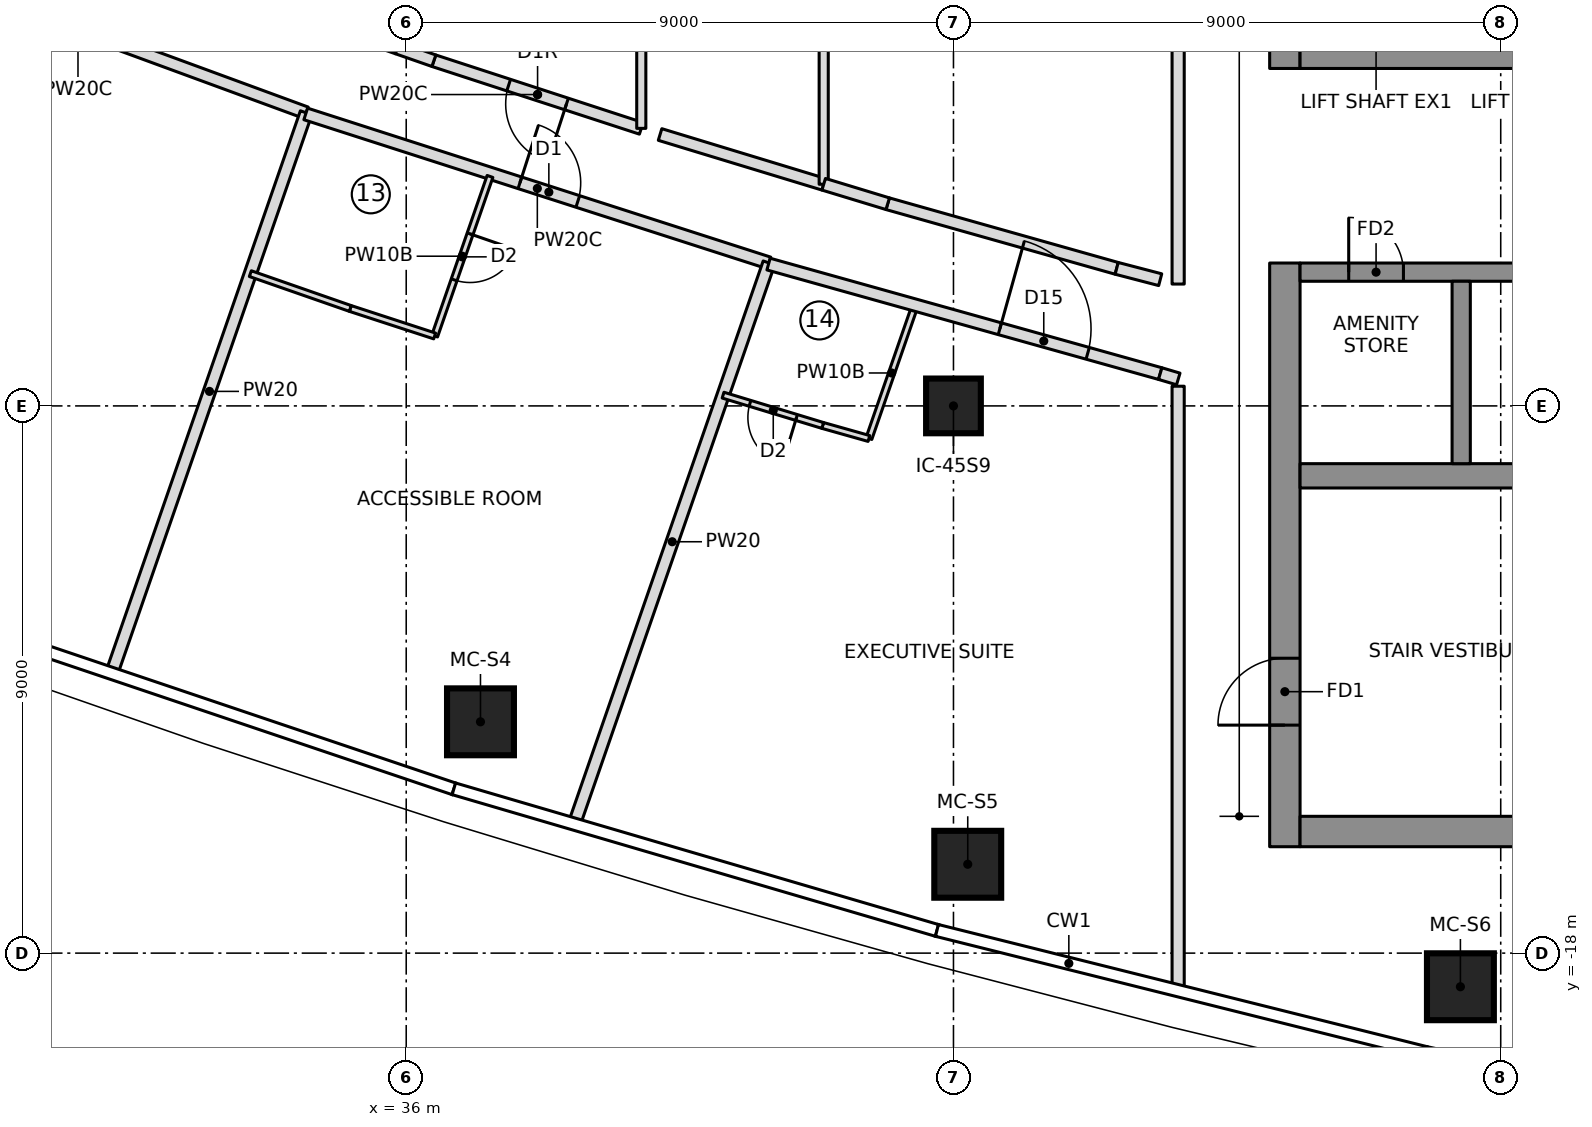
"""IFC4 building model, lengths in metres.
Left out: names, types, materials, properties, quantities, classifications, styles, units other than length and angle.
Written with IfcOpenShell. Run it as: python <this file> out.ifc"""

import sys

from ifc_helpers import new_model, si_unit, direction, frame, frame_2d, origin, origin_2d, place, context, subcontext, project, spatial, polyline, rectangle, outline, extrude, element, fill, save


model = new_model("IFC4")
c1 = context("Model", 3, precision=1e-05, world=origin(), true_north=direction((0.0, 1.0)))
c2 = subcontext(c1, "Body", "Model", "MODEL_VIEW")
j1 = project(units=[si_unit("LENGTHUNIT", "METRE"), si_unit("PLANEANGLEUNIT", "RADIAN")], contexts=[c1])
p1 = place(None, origin())
s1 = spatial("IfcSite", under=j1, at=p1, CompositionType="ELEMENT")
p2 = place(p1, origin())
s2 = spatial("IfcBuilding", under=s1, at=p2, CompositionType="ELEMENT")
p3 = place(p2, frame((0.0, 0.0, 299.85)))
s3 = spatial("IfcBuildingStorey", under=s2, at=p3, CompositionType="ELEMENT", Elevation=299.85)
p4 = place(p3, frame((50.45, -3.45, 0.0), z_axis=(0.0, 0.0, 1.0), x_axis=(0.0, 1.0, 0.0)))
e1 = element("IfcWall", 1, at=p4, inside=s3, PredefinedType="SHEAR", context=c2, shape_type="SweptSolid", body=[
    extrude(rectangle(XDim=6.9, YDim=0.5, at=frame_2d((3.45, 0.0))), origin(), (0.0, 0.0, 1.0), 3.55),
])
p5 = place(p3, frame((50.45, -16.25, 0.0), z_axis=(0.0, 0.0, 1.0), x_axis=(0.0, 1.0, 0.0)))
e2 = element("IfcWall", 2, at=p5, inside=s3, PredefinedType="SHEAR", context=c2, shape_type="SweptSolid", body=[
    extrude(rectangle(XDim=9.6, YDim=0.5, at=frame_2d((4.8, 0.0))), origin(), (0.0, 0.0, 1.0), 3.55),
])
p6 = place(p5, frame((2.0, 0.0, 0.0)))
e3 = element("IfcOpeningElement", 3, at=p6, cuts=e2, PredefinedType="OPENING", context=c2, shape_type="SweptSolid", body=[
    extrude(rectangle(XDim=1.1, YDim=2.1, at=frame_2d((0.55, 1.05))), frame((0.0, 0.26, 0.0), z_axis=(0.0, -1.0, 0.0), x_axis=(1.0, 0.0, 0.0)), (0.0, 0.0, 1.0), 0.52),
])
p7 = place(p3, frame((50.7, -16.0, 0.0), z_axis=(0.0, 0.0, 1.0), x_axis=(1.0, 0.0, 0.0)))
e4 = element("IfcWall", 4, at=p7, inside=s3, PredefinedType="SHEAR", context=c2, shape_type="SweptSolid", body=[
    extrude(rectangle(XDim=13.52, YDim=0.5, at=frame_2d((6.76, 0.0))), origin(), (0.0, 0.0, 1.0), 3.55),
])
p8 = place(p3, frame((50.7, -10.15, 0.0), z_axis=(0.0, 0.0, 1.0), x_axis=(1.0, 0.0, 0.0)))
e5 = element("IfcWall", 5, at=p8, inside=s3, PredefinedType="SHEAR", context=c2, shape_type="SweptSolid", body=[
    extrude(rectangle(XDim=13.02, YDim=0.4, at=frame_2d((6.51, 0.0))), origin(), (0.0, 0.0, 1.0), 3.55),
])
p9 = place(p3, frame((50.7, -3.3, 0.0), z_axis=(0.0, 0.0, 1.0), x_axis=(1.0, 0.0, 0.0)))
e6 = element("IfcWall", 6, at=p9, inside=s3, PredefinedType="SHEAR", context=c2, shape_type="SweptSolid", body=[
    extrude(rectangle(XDim=10.9, YDim=0.3, at=frame_2d((5.45, 0.0))), origin(), (0.0, 0.0, 1.0), 3.55),
])
p10 = place(p9, frame((9.1, 0.0, 0.0)))
e7 = element("IfcOpeningElement", 7, at=p10, cuts=e6, PredefinedType="OPENING", context=c2, shape_type="SweptSolid", body=[
    extrude(rectangle(XDim=1.1, YDim=2.1, at=frame_2d((0.55, 1.05))), frame((0.0, 0.16, 0.0), z_axis=(0.0, -1.0, 0.0), x_axis=(1.0, 0.0, 0.0)), (0.0, 0.0, 1.0), 0.32),
])
p11 = place(p3, frame((50.7, -6.8, 0.0), z_axis=(0.0, 0.0, 1.0), x_axis=(1.0, 0.0, 0.0)))
e8 = element("IfcWall", 8, at=p11, inside=s3, PredefinedType="SHEAR", context=c2, shape_type="SweptSolid", body=[
    extrude(rectangle(XDim=10.9, YDim=0.3, at=frame_2d((5.45, 0.0))), origin(), (0.0, 0.0, 1.0), 3.55),
])
p12 = place(p11, frame((6.3, 0.0, 0.0)))
e9 = element("IfcOpeningElement", 9, at=p12, cuts=e8, PredefinedType="OPENING", context=c2, shape_type="SweptSolid", body=[
    extrude(rectangle(XDim=1.1, YDim=2.1, at=frame_2d((0.55, 1.05))), frame((0.0, 0.16, 0.0), z_axis=(0.0, -1.0, 0.0), x_axis=(1.0, 0.0, 0.0)), (0.0, 0.0, 1.0), 0.32),
])
p13 = place(p11, frame((9.1, 0.0, 0.0)))
e10 = element("IfcOpeningElement", 10, at=p13, cuts=e8, PredefinedType="OPENING", context=c2, shape_type="SweptSolid", body=[
    extrude(rectangle(XDim=1.1, YDim=2.1, at=frame_2d((0.55, 1.05))), frame((0.0, 0.16, 0.0), z_axis=(0.0, -1.0, 0.0), x_axis=(1.0, 0.0, 0.0)), (0.0, 0.0, 1.0), 0.32),
])
p14 = place(p11, frame((0.8, 0.0, 0.0)))
e11 = element("IfcOpeningElement", 11, at=p14, cuts=e8, PredefinedType="OPENING", context=c2, shape_type="SweptSolid", body=[
    extrude(rectangle(XDim=0.9, YDim=2.1, at=frame_2d((0.45, 1.05))), frame((0.0, 0.16, 0.0), z_axis=(0.0, -1.0, 0.0), x_axis=(1.0, 0.0, 0.0)), (0.0, 0.0, 1.0), 0.32),
])
p15 = place(p11, frame((3.6, 0.0, 0.0)))
e12 = element("IfcOpeningElement", 12, at=p15, cuts=e8, PredefinedType="OPENING", context=c2, shape_type="SweptSolid", body=[
    extrude(rectangle(XDim=0.9, YDim=2.1, at=frame_2d((0.45, 1.05))), frame((0.0, 0.16, 0.0), z_axis=(0.0, -1.0, 0.0), x_axis=(1.0, 0.0, 0.0)), (0.0, 0.0, 1.0), 0.32),
])
p16 = place(p3, frame((53.35, -9.95, 0.0), z_axis=(0.0, 0.0, 1.0), x_axis=(0.0, 1.0, 0.0)))
e13 = element("IfcWall", 13, at=p16, inside=s3, PredefinedType="SHEAR", context=c2, shape_type="SweptSolid", body=[
    extrude(rectangle(XDim=3.0, YDim=0.3, at=frame_2d((1.5, 0.0))), origin(), (0.0, 0.0, 1.0), 3.55),
])
for number, where, z_axis, x_axis in (
    (14, (37.221, -14.196, 0.0), (0.0, 0.0, 1.0), (1.0, 0.0, 0.0)),
    (15, (45.235, -16.539, 0.0), (0.0, 0.0, 1.0), (1.0, 0.0, 0.0)),
    (16, (53.337, -18.553, 0.0), (0.0, 0.0, 1.0), (1.0, 0.0, 0.0)),
):
    element("IfcColumn", number, at=place(p3, frame(where, z_axis=z_axis, x_axis=x_axis)), inside=s3, PredefinedType="COLUMN", context=c2, shape_type="SweptSolid", body=[
        extrude(rectangle(XDim=1.1, YDim=1.1, at=origin_2d()), origin(), (0.0, 0.0, 1.0), 3.55),
    ])
p17 = place(p3, frame((45.0, -9.0, 0.0), z_axis=(0.0, 0.0, 1.0), x_axis=(1.0, 0.0, 0.0)))
e17 = element("IfcColumn", 17, at=p17, inside=s3, PredefinedType="COLUMN", context=c2, shape_type="SweptSolid", body=[
    extrude(rectangle(XDim=0.9, YDim=0.9, at=origin_2d()), origin(), (0.0, 0.0, 1.0), 3.55),
])
p18 = place(p3, frame((52.738, -19.732, 0.0), z_axis=(0.0, 0.0, 1.0), x_axis=(0.977020225348, -0.213146614471, 0.0)))
e18 = element("IfcWall", 18, at=p18, inside=s3, PredefinedType="NOTDEFINED", context=c2, shape_type="SweptSolid", body=[
    extrude(outline(polyline([(0.0, -0.2), (4.171, -0.2), (4.113, 0.2), (0.0, 0.2), (0.0, -0.2)])), origin(), (0.0, 0.0, 1.0), 3.25),
])
p19 = place(p3, frame((26.85, -1.423, 0.0), z_axis=(0.0, 0.0, 1.0), x_axis=(0.938687309179, -0.344769684843, 0.0)))
e19 = element("IfcWall", 19, at=p19, inside=s3, PredefinedType="PARTITIONING", context=c2, shape_type="SweptSolid", body=[
    extrude(rectangle(XDim=7.994, YDim=0.2, at=frame_2d((3.997, 0.0))), origin(), (0.0, 0.0, 1.0), 3.15),
])
p20 = place(p19, frame((3.05, 0.0, 0.0)))
e20 = element("IfcOpeningElement", 20, at=p20, cuts=e19, PredefinedType="OPENING", context=c2, shape_type="SweptSolid", body=[
    extrude(rectangle(XDim=1.0, YDim=2.1, at=frame_2d((0.5, 1.05))), frame((0.0, 0.11, 0.0), z_axis=(0.0, -1.0, 0.0), x_axis=(1.0, 0.0, 0.0)), (0.0, 0.0, 1.0), 0.22),
])
p21 = place(p3, frame((31.175, -13.344, 0.0), z_axis=(0.0, 0.0, 1.0), x_axis=(0.327696596093, 0.944783012606, 0.0)))
e21 = element("IfcWall", 21, at=p21, inside=s3, PredefinedType="PARTITIONING", context=c2, shape_type="SweptSolid", body=[
    extrude(rectangle(XDim=9.7, YDim=0.2, at=frame_2d((4.85, 0.0))), origin(), (0.0, 0.0, 1.0), 3.15),
])
p22 = place(p3, frame((34.347, -4.198, 0.0), z_axis=(0.0, 0.0, 1.0), x_axis=(0.951959334907, -0.306224467805, 0.0)))
e22 = element("IfcWall", 22, at=p22, inside=s3, PredefinedType="PARTITIONING", context=c2, shape_type="SweptSolid", body=[
    extrude(rectangle(XDim=8.002, YDim=0.2, at=frame_2d((4.001, 0.0))), origin(), (0.0, 0.0, 1.0), 3.15),
])
p23 = place(p22, frame((3.7, 0.0, 0.0)))
e23 = element("IfcOpeningElement", 23, at=p23, cuts=e22, PredefinedType="OPENING", context=c2, shape_type="SweptSolid", body=[
    extrude(rectangle(XDim=1.0, YDim=2.1, at=frame_2d((0.5, 1.05))), frame((0.0, 0.11, 0.0), z_axis=(0.0, -1.0, 0.0), x_axis=(1.0, 0.0, 0.0)), (0.0, 0.0, 1.0), 0.22),
])
p24 = place(p3, frame((37.378, -5.226, 0.0), z_axis=(0.0, 0.0, 1.0), x_axis=(-0.327702248101, -0.944781052197, 0.0)))
e24 = element("IfcWall", 24, at=p24, inside=s3, PredefinedType="PARTITIONING", context=c2, shape_type="SweptSolid", body=[
    extrude(rectangle(XDim=2.777, YDim=0.1, at=frame_2d((1.389, 0.0))), origin(), (0.0, 0.0, 1.0), 3.15),
])
p25 = place(p24, frame((1.0, 0.0, 0.0)))
e25 = element("IfcOpeningElement", 25, at=p25, cuts=e24, PredefinedType="OPENING", context=c2, shape_type="SweptSolid", body=[
    extrude(rectangle(XDim=0.8, YDim=2.1, at=frame_2d((0.4, 1.05))), frame((0.0, 0.06, 0.0), z_axis=(0.0, -1.0, 0.0), x_axis=(1.0, 0.0, 0.0)), (0.0, 0.0, 1.0), 0.12),
])
p26 = place(p3, frame((36.468, -7.85, 0.0), z_axis=(0.0, 0.0, 1.0), x_axis=(-0.95070411494, 0.310099477322, 0.0)))
e26 = element("IfcWall", 26, at=p26, inside=s3, PredefinedType="PARTITIONING", context=c2, shape_type="SweptSolid", body=[
    extrude(rectangle(XDim=1.46, YDim=0.1, at=frame_2d((0.73, 0.0))), origin(), (0.0, 0.0, 1.0), 3.15),
])
p27 = place(p3, frame((35.08, -7.397, 0.0), z_axis=(0.0, 0.0, 1.0), x_axis=(-0.944260018318, 0.329200573825, 0.0)))
e27 = element("IfcWall", 27, at=p27, inside=s3, PredefinedType="PARTITIONING", context=c2, shape_type="SweptSolid", body=[
    extrude(rectangle(XDim=1.74, YDim=0.1, at=frame_2d((0.87, 0.0))), origin(), (0.0, 0.0, 1.0), 3.15),
])
p28 = place(p3, frame((38.784, -15.82, 0.0), z_axis=(0.0, 0.0, 1.0), x_axis=(0.327710853631, 0.944778067279, 0.0)))
e28 = element("IfcWall", 28, at=p28, inside=s3, PredefinedType="PARTITIONING", context=c2, shape_type="SweptSolid", body=[
    extrude(rectangle(XDim=9.707, YDim=0.2, at=frame_2d((4.854, 0.0))), origin(), (0.0, 0.0, 1.0), 3.15),
])
p29 = place(p3, frame((44.357, -7.381, 0.0), z_axis=(0.0, 0.0, 1.0), x_axis=(-0.32773175909, -0.944770815639, 0.0)))
e29 = element("IfcWall", 29, at=p29, inside=s3, PredefinedType="PARTITIONING", context=c2, shape_type="SweptSolid", body=[
    extrude(rectangle(XDim=2.281, YDim=0.1, at=frame_2d((1.141, 0.0))), origin(), (0.0, 0.0, 1.0), 3.15),
])
p30 = place(p3, frame((43.61, -9.536, 0.0), z_axis=(0.0, 0.0, 1.0), x_axis=(-0.962370937031, 0.271739175603, 0.0)))
e30 = element("IfcWall", 30, at=p30, inside=s3, PredefinedType="PARTITIONING", context=c2, shape_type="SweptSolid", body=[
    extrude(rectangle(XDim=0.79, YDim=0.1, at=frame_2d((0.395, 0.0))), origin(), (0.0, 0.0, 1.0), 3.15),
])
p31 = place(p3, frame((42.85, -9.321, 0.0), z_axis=(0.0, 0.0, 1.0), x_axis=(-0.95674463014, 0.290929050971, 0.0)))
e31 = element("IfcWall", 31, at=p31, inside=s3, PredefinedType="PARTITIONING", context=c2, shape_type="SweptSolid", body=[
    extrude(rectangle(XDim=1.713, YDim=0.1, at=frame_2d((0.856, 0.0))), origin(), (0.0, 0.0, 1.0), 3.15),
])
p32 = place(p31, frame((0.45, 0.0, 0.0)))
e32 = element("IfcOpeningElement", 32, at=p32, cuts=e31, PredefinedType="OPENING", context=c2, shape_type="SweptSolid", body=[
    extrude(rectangle(XDim=0.8, YDim=2.1, at=frame_2d((0.4, 1.05))), frame((0.0, 0.06, 0.0), z_axis=(0.0, -1.0, 0.0), x_axis=(1.0, 0.0, 0.0)), (0.0, 0.0, 1.0), 0.12),
])
p33 = place(p3, frame((35.855, -3.114, 0.0), z_axis=(0.0, 0.0, 1.0), x_axis=(-0.944260188635, 0.329200085296, 0.0)))
e33 = element("IfcWall", 33, at=p33, inside=s3, PredefinedType="PARTITIONING", context=c2, shape_type="SweptSolid", body=[
    extrude(rectangle(XDim=3.177, YDim=0.2, at=frame_2d((1.588, 0.0))), origin(), (0.0, 0.0, 1.0), 3.15),
])
p34 = place(p3, frame((39.866, -4.435, 0.0), z_axis=(0.0, 0.0, 1.0), x_axis=(-0.950718067733, 0.310056697535, 0.0)))
e34 = element("IfcWall", 34, at=p34, inside=s3, PredefinedType="PARTITIONING", context=c2, shape_type="SweptSolid", body=[
    extrude(rectangle(XDim=3.588, YDim=0.2, at=frame_2d((1.794, 0.0))), origin(), (0.0, 0.0, 1.0), 3.15),
])
p35 = place(p34, frame((1.294, 0.0, 0.0)))
e35 = element("IfcOpeningElement", 35, at=p35, cuts=e34, PredefinedType="OPENING", context=c2, shape_type="SweptSolid", body=[
    extrude(rectangle(XDim=1.0, YDim=2.1, at=frame_2d((0.5, 1.05))), frame((0.0, 0.11, 0.0), z_axis=(0.0, -1.0, 0.0), x_axis=(1.0, 0.0, 0.0)), (0.0, 0.0, 1.0), 0.22),
])
p36 = place(p3, frame((36.455, -3.323, 0.0), z_axis=(0.0, 0.0, 1.0), x_axis=(-0.944289130413, 0.329117058483, 0.0)))
e36 = element("IfcWall", 36, at=p36, inside=s3, PredefinedType="PARTITIONING", context=c2, shape_type="SweptSolid", body=[
    extrude(rectangle(XDim=0.635, YDim=0.2, at=frame_2d((0.317, 0.0))), origin(), (0.0, 0.0, 1.0), 3.15),
])
p37 = place(p3, frame((39.866, -4.435, 0.0), z_axis=(0.0, 0.0, 1.0), x_axis=(0.0, 1.0, 0.0)))
e37 = element("IfcWall", 37, at=p37, inside=s3, PredefinedType="PARTITIONING", context=c2, shape_type="SweptSolid", body=[
    extrude(rectangle(XDim=8.871, YDim=0.15, at=frame_2d((4.435, 0.0))), origin(), (0.0, 0.0, 1.0), 3.15),
])
p38 = place(p3, frame((42.866, -5.354, 0.0), z_axis=(0.0, 0.0, 1.0), x_axis=(-0.956742178936, 0.290937111838, 0.0)))
e38 = element("IfcWall", 38, at=p38, inside=s3, PredefinedType="PARTITIONING", context=c2, shape_type="SweptSolid", body=[
    extrude(rectangle(XDim=2.813, YDim=0.2, at=frame_2d((1.406, 0.0))), origin(), (0.0, 0.0, 1.0), 3.15),
])
p39 = place(p3, frame((42.866, -5.354, 0.0), z_axis=(0.0, 0.0, 1.0), x_axis=(0.0, 1.0, 0.0)))
e39 = element("IfcWall", 39, at=p39, inside=s3, PredefinedType="PARTITIONING", context=c2, shape_type="SweptSolid", body=[
    extrude(rectangle(XDim=10.709, YDim=0.15, at=frame_2d((5.354, 0.0))), origin(), (0.0, 0.0, 1.0), 3.15),
])
p40 = place(p3, frame((47.684, -6.738, 0.0), z_axis=(0.0, 0.0, 1.0), x_axis=(-0.962411212211, 0.271596499628, 0.0)))
e40 = element("IfcWall", 40, at=p40, inside=s3, PredefinedType="PARTITIONING", context=c2, shape_type="SweptSolid", body=[
    extrude(rectangle(XDim=3.913, YDim=0.2, at=frame_2d((1.957, 0.0))), origin(), (0.0, 0.0, 1.0), 3.15),
])
p41 = place(p3, frame((43.918, -5.675, 0.0), z_axis=(0.0, 0.0, 1.0), x_axis=(-0.956676567943, 0.291152785233, 0.0)))
e41 = element("IfcWall", 41, at=p41, inside=s3, PredefinedType="PARTITIONING", context=c2, shape_type="SweptSolid", body=[
    extrude(rectangle(XDim=1.1, YDim=0.2, at=frame_2d((0.55, 0.0))), origin(), (0.0, 0.0, 1.0), 3.15),
])
p42 = place(p3, frame((41.958, -6.667, 0.0), z_axis=(0.0, 0.0, 1.0), x_axis=(0.963063656884, -0.269273824925, 0.0)))
e42 = element("IfcWall", 42, at=p42, inside=s3, PredefinedType="PARTITIONING", context=c2, shape_type="SweptSolid", body=[
    extrude(rectangle(XDim=6.688, YDim=0.2, at=frame_2d((3.344, 0.0))), origin(), (0.0, 0.0, 1.0), 3.15),
])
p43 = place(p42, frame((3.95, 0.0, 0.0)))
e43 = element("IfcOpeningElement", 43, at=p43, cuts=e42, PredefinedType="OPENING", context=c2, shape_type="SweptSolid", body=[
    extrude(rectangle(XDim=1.5, YDim=2.1, at=frame_2d((0.75, 1.05))), frame((0.0, 0.11, 0.0), z_axis=(0.0, -1.0, 0.0), x_axis=(1.0, 0.0, 0.0)), (0.0, 0.0, 1.0), 0.22),
])
p44 = place(p3, frame((48.4, -6.924, 0.0), z_axis=(0.0, 0.0, 1.0), x_axis=(-0.967585713416, 0.252542842294, 0.0)))
e44 = element("IfcWall", 44, at=p44, inside=s3, PredefinedType="PARTITIONING", context=c2, shape_type="SweptSolid", body=[
    extrude(rectangle(XDim=0.74, YDim=0.2, at=frame_2d((0.37, 0.0))), origin(), (0.0, 0.0, 1.0), 3.15),
])
p45 = place(p3, frame((48.695, 6.996, 0.0), z_axis=(0.0, 0.0, 1.0), x_axis=(0.0, -1.0, 0.0)))
e45 = element("IfcWall", 45, at=p45, inside=s3, PredefinedType="PARTITIONING", context=c2, shape_type="SweptSolid", body=[
    extrude(rectangle(XDim=13.992, YDim=0.2, at=frame_2d((6.996, 0.0))), origin(), (0.0, 0.0, 1.0), 3.15),
])
p46 = place(p3, frame((48.4, -8.469, 0.0), z_axis=(0.0, 0.0, 1.0), x_axis=(0.958495645602, -0.285107168207, 0.0)))
e46 = element("IfcWall", 46, at=p46, inside=s3, PredefinedType="PARTITIONING", context=c2, shape_type="SweptSolid", body=[
    extrude(rectangle(XDim=0.31, YDim=0.2, at=frame_2d((0.155, 0.0))), origin(), (0.0, 0.0, 1.0), 3.15),
])
p47 = place(p3, frame((48.695, -8.676, 0.0), z_axis=(0.0, 0.0, 1.0), x_axis=(0.0, -1.0, 0.0)))
e47 = element("IfcWall", 47, at=p47, inside=s3, PredefinedType="PARTITIONING", context=c2, shape_type="SweptSolid", body=[
    extrude(rectangle(XDim=9.877, YDim=0.2, at=frame_2d((4.938, 0.0))), origin(), (0.0, 0.0, 1.0), 3.15),
])
p48 = place(p25, origin())
e48 = element("IfcDoor", 48, at=p48, inside=s3, OperationType="SINGLE_SWING_LEFT", PredefinedType="DOOR", context=c2, shape_type="SweptSolid", body=[
    extrude(rectangle(XDim=0.8, YDim=2.1, at=frame_2d((0.4, 1.05))), frame((0.0, 0.025, 0.0), z_axis=(0.0, -1.0, 0.0), x_axis=(1.0, 0.0, 0.0)), (0.0, 0.0, 1.0), 0.05),
])
fill(e25, e48)
p49 = place(p23, origin())
e49 = element("IfcDoor", 49, at=p49, inside=s3, OperationType="SINGLE_SWING_LEFT", PredefinedType="DOOR", context=c2, shape_type="SweptSolid", body=[
    extrude(rectangle(XDim=1.0, YDim=2.1, at=frame_2d((0.5, 1.05))), frame((0.0, 0.025, 0.0), z_axis=(0.0, -1.0, 0.0), x_axis=(1.0, 0.0, 0.0)), (0.0, 0.0, 1.0), 0.05),
])
fill(e23, e49)
p50 = place(p32, origin())
e50 = element("IfcDoor", 50, at=p50, inside=s3, OperationType="SINGLE_SWING_LEFT", PredefinedType="DOOR", context=c2, shape_type="SweptSolid", body=[
    extrude(rectangle(XDim=0.8, YDim=2.1, at=frame_2d((0.4, 1.05))), frame((0.0, 0.025, 0.0), z_axis=(0.0, -1.0, 0.0), x_axis=(1.0, 0.0, 0.0)), (0.0, 0.0, 1.0), 0.05),
])
fill(e32, e50)
p51 = place(p43, origin())
e51 = element("IfcDoor", 51, at=p51, inside=s3, OperationType="DOUBLE_DOOR_SINGLE_SWING", PredefinedType="DOOR", context=c2, shape_type="SweptSolid", body=[
    extrude(rectangle(XDim=1.5, YDim=2.1, at=frame_2d((0.75, 1.05))), frame((0.0, 0.025, 0.0), z_axis=(0.0, -1.0, 0.0), x_axis=(1.0, 0.0, 0.0)), (0.0, 0.0, 1.0), 0.05),
])
fill(e43, e51)
p52 = place(p35, origin())
e52 = element("IfcDoor", 52, at=p52, inside=s3, OperationType="SINGLE_SWING_RIGHT", PredefinedType="DOOR", context=c2, shape_type="SweptSolid", body=[
    extrude(rectangle(XDim=1.0, YDim=2.1, at=frame_2d((0.5, 1.05))), frame((0.0, 0.025, 0.0), z_axis=(0.0, -1.0, 0.0), x_axis=(1.0, 0.0, 0.0)), (0.0, 0.0, 1.0), 0.05),
])
fill(e35, e52)
p53 = place(p6, origin())
e53 = element("IfcDoor", 53, at=p53, inside=s3, OperationType="SINGLE_SWING_RIGHT", PredefinedType="DOOR", context=c2, shape_type="SweptSolid", body=[
    extrude(rectangle(XDim=1.1, YDim=2.1, at=frame_2d((0.55, 1.05))), frame((0.0, 0.025, 0.0), z_axis=(0.0, -1.0, 0.0), x_axis=(1.0, 0.0, 0.0)), (0.0, 0.0, 1.0), 0.05),
])
fill(e3, e53)
p54 = place(p14, origin())
e54 = element("IfcDoor", 54, at=p54, inside=s3, OperationType="SINGLE_SWING_LEFT", PredefinedType="DOOR", context=c2, shape_type="SweptSolid", body=[
    extrude(rectangle(XDim=0.9, YDim=2.1, at=frame_2d((0.45, 1.05))), frame((0.0, 0.025, 0.0), z_axis=(0.0, -1.0, 0.0), x_axis=(1.0, 0.0, 0.0)), (0.0, 0.0, 1.0), 0.05),
])
fill(e11, e54)
save(model, sys.argv[1])
